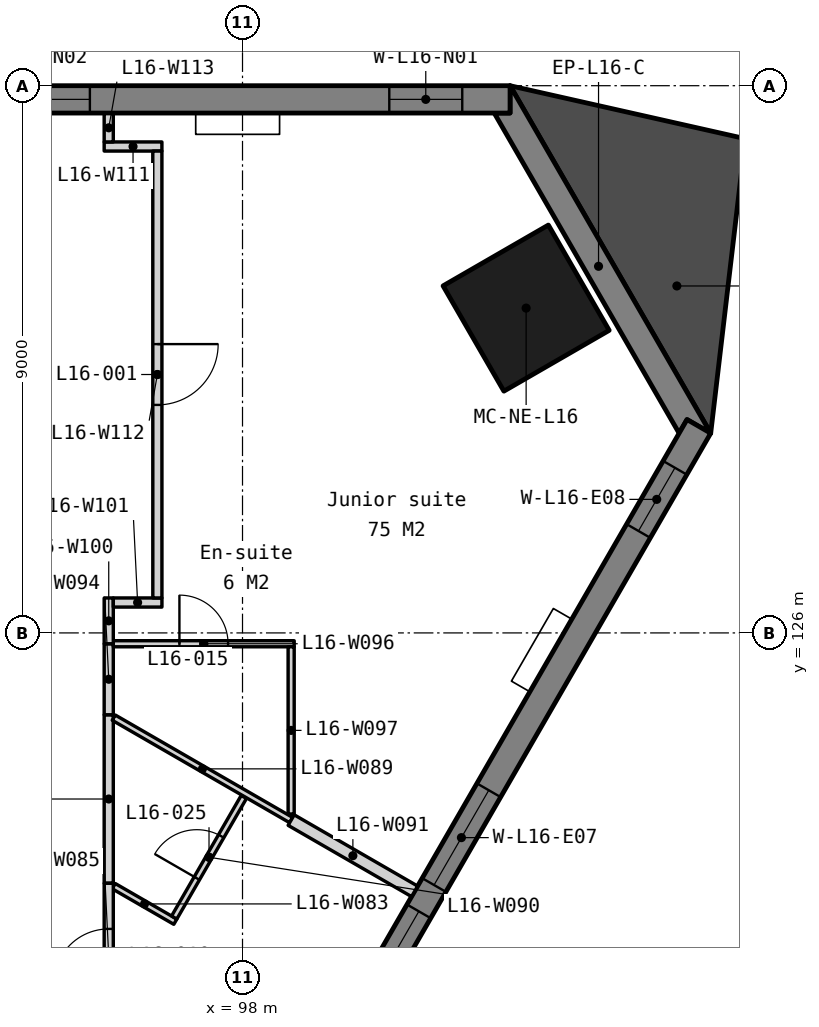
"""IFC4 building model, lengths in metres.
Left out: names, types, materials, properties, quantities, classifications, styles, units other than length and angle.
Written with IfcOpenShell. Run it as: python <this file> out.ifc"""

import sys

from ifc_helpers import new_model, si_unit, direction, frame, frame_2d, origin, origin_2d, place, context, subcontext, project, spatial, polyline, rectangle, outline, extrude, element, fill, save


model = new_model("IFC4")
c1 = context("Model", 3, precision=1e-05, world=origin(), true_north=direction((0.0, 1.0)))
c2 = subcontext(c1, "Body", "Model", "MODEL_VIEW")
j1 = project(units=[si_unit("LENGTHUNIT", "METRE"), si_unit("PLANEANGLEUNIT", "RADIAN")], contexts=[c1])
p1 = place(None, origin())
s1 = spatial("IfcSite", under=j1, at=p1, CompositionType="ELEMENT")
p2 = place(p1, origin())
s2 = spatial("IfcBuilding", under=s1, at=p2, CompositionType="ELEMENT")
p3 = place(p2, frame((0.0, 0.0, 70.0)))
s3 = spatial("IfcBuildingStorey", under=s2, at=p3, CompositionType="ELEMENT", Elevation=70.0)
p4 = place(p3, frame((102.664, 131.342, 0.0), z_axis=(0.0, 0.0, 1.0), x_axis=(-0.5, 0.866025403784, 0.0)))
e1 = element("IfcColumn", 1, at=p4, inside=s3, PredefinedType="COLUMN", context=c2, shape_type="SweptSolid", body=[
    extrude(rectangle(XDim=2.0, YDim=2.0, at=origin_2d()), origin(), (0.0, 0.0, 1.0), 3.5),
])
p5 = place(p3, frame((0.0, 0.0, -0.15)))
e2 = element("IfcWall", 2, at=p5, inside=s3, PredefinedType="SOLIDWALL", context=c2, shape_type="SweptSolid", body=[
    extrude(outline(polyline([(105.7, 129.284), (105.31, 129.509), (105.18, 129.284), (102.14, 134.55), (102.4, 134.55), (102.4, 135.0), (105.7, 129.284)])), origin(), (0.0, 0.0, 1.0), 3.5),
])
p6 = place(p3, frame((102.4, 134.775, -0.15), z_axis=(0.0, 0.0, 1.0), x_axis=(-1.0, 0.0, 0.0)))
e3 = element("IfcWall", 3, at=p6, inside=s3, PredefinedType="SOLIDWALL", context=c2, shape_type="SweptSolid", body=[
    extrude(outline(polyline([(44.8, 0.0), (44.8, 3.5), (0.0, 3.5), (0.0, 0.0), (44.8, 0.0)])), frame((0.0, 0.225, 0.0), z_axis=(0.0, -1.0, 0.0), x_axis=(1.0, 0.0, 0.0)), (0.0, 0.0, 1.0), 0.45),
])
p7 = place(p6, frame((0.786, 0.0, 1.05)))
e4 = element("IfcOpeningElement", 4, at=p7, cuts=e3, PredefinedType="OPENING", context=c2, shape_type="SweptSolid", body=[
    extrude(rectangle(XDim=1.2, YDim=1.5, at=frame_2d((0.6, 0.75))), frame((0.0, 0.235, 0.0), z_axis=(0.0, -1.0, 0.0), x_axis=(1.0, 0.0, 0.0)), (0.0, 0.0, 1.0), 0.47),
])
p8 = place(p6, frame((6.91, 0.0, 1.05)))
e5 = element("IfcOpeningElement", 5, at=p8, cuts=e3, PredefinedType="OPENING", context=c2, shape_type="SweptSolid", body=[
    extrude(rectangle(XDim=1.8, YDim=1.5, at=frame_2d((0.9, 0.75))), frame((0.0, 0.235, 0.0), z_axis=(0.0, -1.0, 0.0), x_axis=(1.0, 0.0, 0.0)), (0.0, 0.0, 1.0), 0.47),
])
p9 = place(p6, frame((9.21, 0.0, 1.05)))
e6 = element("IfcOpeningElement", 6, at=p9, cuts=e3, PredefinedType="OPENING", context=c2, shape_type="SweptSolid", body=[
    extrude(rectangle(XDim=1.8, YDim=1.5, at=frame_2d((0.9, 0.75))), frame((0.0, 0.235, 0.0), z_axis=(0.0, -1.0, 0.0), x_axis=(1.0, 0.0, 0.0)), (0.0, 0.0, 1.0), 0.47),
])
p10 = place(p6, frame((15.87, 0.0, 1.05)))
e7 = element("IfcOpeningElement", 7, at=p10, cuts=e3, PredefinedType="OPENING", context=c2, shape_type="SweptSolid", body=[
    extrude(rectangle(XDim=1.8, YDim=1.5, at=frame_2d((0.9, 0.75))), frame((0.0, 0.235, 0.0), z_axis=(0.0, -1.0, 0.0), x_axis=(1.0, 0.0, 0.0)), (0.0, 0.0, 1.0), 0.47),
])
p11 = place(p6, frame((18.17, 0.0, 1.05)))
e8 = element("IfcOpeningElement", 8, at=p11, cuts=e3, PredefinedType="OPENING", context=c2, shape_type="SweptSolid", body=[
    extrude(rectangle(XDim=1.8, YDim=1.5, at=frame_2d((0.9, 0.75))), frame((0.0, 0.235, 0.0), z_axis=(0.0, -1.0, 0.0), x_axis=(1.0, 0.0, 0.0)), (0.0, 0.0, 1.0), 0.47),
])
p12 = place(p6, frame((24.83, 0.0, 1.05)))
e9 = element("IfcOpeningElement", 9, at=p12, cuts=e3, PredefinedType="OPENING", context=c2, shape_type="SweptSolid", body=[
    extrude(rectangle(XDim=1.8, YDim=1.5, at=frame_2d((0.9, 0.75))), frame((0.0, 0.235, 0.0), z_axis=(0.0, -1.0, 0.0), x_axis=(1.0, 0.0, 0.0)), (0.0, 0.0, 1.0), 0.47),
])
p13 = place(p6, frame((27.13, 0.0, 1.05)))
e10 = element("IfcOpeningElement", 10, at=p13, cuts=e3, PredefinedType="OPENING", context=c2, shape_type="SweptSolid", body=[
    extrude(rectangle(XDim=1.8, YDim=1.5, at=frame_2d((0.9, 0.75))), frame((0.0, 0.235, 0.0), z_axis=(0.0, -1.0, 0.0), x_axis=(1.0, 0.0, 0.0)), (0.0, 0.0, 1.0), 0.47),
])
p14 = place(p6, frame((33.79, 0.0, 1.05)))
e11 = element("IfcOpeningElement", 11, at=p14, cuts=e3, PredefinedType="OPENING", context=c2, shape_type="SweptSolid", body=[
    extrude(rectangle(XDim=1.8, YDim=1.5, at=frame_2d((0.9, 0.75))), frame((0.0, 0.235, 0.0), z_axis=(0.0, -1.0, 0.0), x_axis=(1.0, 0.0, 0.0)), (0.0, 0.0, 1.0), 0.47),
])
p15 = place(p6, frame((36.09, 0.0, 1.05)))
e12 = element("IfcOpeningElement", 12, at=p15, cuts=e3, PredefinedType="OPENING", context=c2, shape_type="SweptSolid", body=[
    extrude(rectangle(XDim=1.8, YDim=1.5, at=frame_2d((0.9, 0.75))), frame((0.0, 0.235, 0.0), z_axis=(0.0, -1.0, 0.0), x_axis=(1.0, 0.0, 0.0)), (0.0, 0.0, 1.0), 0.47),
])
p16 = place(p6, frame((42.814, 0.0, 1.05)))
e13 = element("IfcOpeningElement", 13, at=p16, cuts=e3, PredefinedType="OPENING", context=c2, shape_type="SweptSolid", body=[
    extrude(rectangle(XDim=1.2, YDim=1.5, at=frame_2d((0.6, 0.75))), frame((0.0, 0.235, 0.0), z_axis=(0.0, -1.0, 0.0), x_axis=(1.0, 0.0, 0.0)), (0.0, 0.0, 1.0), 0.47),
])
p17 = place(p3, frame((88.435, 99.831, -0.15), z_axis=(0.0, 0.0, 1.0), x_axis=(0.500000806382, 0.866024938219, 0.0)))
e14 = element("IfcWall", 14, at=p17, inside=s3, PredefinedType="SOLIDWALL", context=c2, shape_type="SweptSolid", body=[
    extrude(outline(polyline([(34.14, 3.5), (34.14, 0.0), (0.0, 0.0), (0.0, 3.5), (34.14, 3.5)])), frame((0.0, 0.225, 0.0), z_axis=(0.0, -1.0, 0.0), x_axis=(1.0, 0.0, 0.0)), (0.0, 0.0, 1.0), 0.45),
])
p18 = place(p17, frame((5.21, 0.0, 1.05)))
e15 = element("IfcOpeningElement", 15, at=p18, cuts=e14, PredefinedType="OPENING", context=c2, shape_type="SweptSolid", body=[
    extrude(rectangle(XDim=1.8, YDim=1.5, at=frame_2d((0.9, 0.75))), frame((0.0, 0.235, 0.0), z_axis=(0.0, -1.0, 0.0), x_axis=(1.0, 0.0, 0.0)), (0.0, 0.0, 1.0), 0.47),
])
p19 = place(p17, frame((7.51, 0.0, 1.05)))
e16 = element("IfcOpeningElement", 16, at=p19, cuts=e14, PredefinedType="OPENING", context=c2, shape_type="SweptSolid", body=[
    extrude(rectangle(XDim=1.8, YDim=1.5, at=frame_2d((0.9, 0.75))), frame((0.0, 0.235, 0.0), z_axis=(0.0, -1.0, 0.0), x_axis=(1.0, 0.0, 0.0)), (0.0, 0.0, 1.0), 0.47),
])
p20 = place(p17, frame((14.17, 0.0, 1.05)))
e17 = element("IfcOpeningElement", 17, at=p20, cuts=e14, PredefinedType="OPENING", context=c2, shape_type="SweptSolid", body=[
    extrude(rectangle(XDim=1.8, YDim=1.5, at=frame_2d((0.9, 0.75))), frame((0.0, 0.235, 0.0), z_axis=(0.0, -1.0, 0.0), x_axis=(1.0, 0.0, 0.0)), (0.0, 0.0, 1.0), 0.47),
])
p21 = place(p17, frame((16.47, 0.0, 1.05)))
e18 = element("IfcOpeningElement", 18, at=p21, cuts=e14, PredefinedType="OPENING", context=c2, shape_type="SweptSolid", body=[
    extrude(rectangle(XDim=1.8, YDim=1.5, at=frame_2d((0.9, 0.75))), frame((0.0, 0.235, 0.0), z_axis=(0.0, -1.0, 0.0), x_axis=(1.0, 0.0, 0.0)), (0.0, 0.0, 1.0), 0.47),
])
p22 = place(p17, frame((23.13, 0.0, 1.05)))
e19 = element("IfcOpeningElement", 19, at=p22, cuts=e14, PredefinedType="OPENING", context=c2, shape_type="SweptSolid", body=[
    extrude(rectangle(XDim=1.8, YDim=1.5, at=frame_2d((0.9, 0.75))), frame((0.0, 0.235, 0.0), z_axis=(0.0, -1.0, 0.0), x_axis=(1.0, 0.0, 0.0)), (0.0, 0.0, 1.0), 0.47),
])
p23 = place(p17, frame((25.43, 0.0, 1.05)))
e20 = element("IfcOpeningElement", 20, at=p23, cuts=e14, PredefinedType="OPENING", context=c2, shape_type="SweptSolid", body=[
    extrude(rectangle(XDim=1.8, YDim=1.5, at=frame_2d((0.9, 0.75))), frame((0.0, 0.235, 0.0), z_axis=(0.0, -1.0, 0.0), x_axis=(1.0, 0.0, 0.0)), (0.0, 0.0, 1.0), 0.47),
])
p24 = place(p17, frame((32.154, 0.0, 1.05)))
e21 = element("IfcOpeningElement", 21, at=p24, cuts=e14, PredefinedType="OPENING", context=c2, shape_type="SweptSolid", body=[
    extrude(rectangle(XDim=1.2, YDim=1.5, at=frame_2d((0.6, 0.75))), frame((0.0, 0.235, 0.0), z_axis=(0.0, -1.0, 0.0), x_axis=(1.0, 0.0, 0.0)), (0.0, 0.0, 1.0), 0.47),
])
p25 = place(p3, frame((0.0, 0.0, -0.15)))
e22 = element("IfcWall", 22, at=p25, inside=s3, PredefinedType="SOLIDWALL", context=c2, shape_type="SweptSolid", body=[
    extrude(outline(polyline([(105.7, 129.284), (106.27, 134.128), (102.4, 135.0), (105.7, 129.284)])), origin(), (0.0, 0.0, 1.0), 3.5),
])
p26 = place(p3, frame((95.882, 121.835, 0.0), z_axis=(0.0, 0.0, 1.0), x_axis=(0.86601174498, -0.500023656998, 0.0)))
e23 = element("IfcWall", 23, at=p26, inside=s3, PredefinedType="PARTITIONING", context=c2, shape_type="SweptSolid", body=[
    extrude(rectangle(XDim=1.169, YDim=0.1, at=frame_2d((0.585, 0.0))), origin(), (0.0, 0.0, 1.0), 3.35),
])
p27 = place(p3, frame((95.8, 121.883, 0.0), z_axis=(0.0, 0.0, 1.0), x_axis=(0.0, 1.0, 0.0)))
e24 = element("IfcWall", 24, at=p27, inside=s3, PredefinedType="PARTITIONING", context=c2, shape_type="SweptSolid", body=[
    extrude(rectangle(XDim=2.771, YDim=0.15, at=frame_2d((1.386, 0.0))), origin(), (0.0, 0.0, 1.0), 3.35),
])
p28 = place(p3, frame((95.8, 119.481, 0.0), z_axis=(0.0, 0.0, 1.0), x_axis=(0.0, 1.0, 0.0)))
e25 = element("IfcWall", 25, at=p28, inside=s3, PredefinedType="PARTITIONING", context=c2, shape_type="SweptSolid", body=[
    extrude(rectangle(XDim=2.402, YDim=0.15, at=frame_2d((1.201, 0.0))), origin(), (0.0, 0.0, 1.0), 3.35),
])
p29 = place(p28, frame((0.751, 0.0, 0.0)))
e26 = element("IfcOpeningElement", 26, at=p29, cuts=e25, PredefinedType="OPENING", context=c2, shape_type="SweptSolid", body=[
    extrude(rectangle(XDim=0.9, YDim=2.1, at=frame_2d((0.45, 1.05))), frame((0.0, 0.085, 0.0), z_axis=(0.0, -1.0, 0.0), x_axis=(1.0, 0.0, 0.0)), (0.0, 0.0, 1.0), 0.17),
])
p30 = place(p3, frame((95.882, 124.606, 0.0), z_axis=(0.0, 0.0, 1.0), x_axis=(0.866022675988, -0.500004724652, 0.0)))
e27 = element("IfcWall", 27, at=p30, inside=s3, PredefinedType="PARTITIONING", context=c2, shape_type="SweptSolid", body=[
    extrude(rectangle(XDim=3.369, YDim=0.1, at=frame_2d((1.685, 0.0))), origin(), (0.0, 0.0, 1.0), 3.35),
])
p31 = place(p3, frame((96.877, 121.319, 0.0), z_axis=(0.0, 0.0, 1.0), x_axis=(0.499968531483, 0.866043571379, 0.0)))
e28 = element("IfcWall", 28, at=p31, inside=s3, PredefinedType="PARTITIONING", context=c2, shape_type="SweptSolid", body=[
    extrude(rectangle(XDim=2.29, YDim=0.1, at=frame_2d((1.145, 0.0))), origin(), (0.0, 0.0, 1.0), 3.35),
])
p32 = place(p31, frame((0.745, 0.0, 0.0)))
e29 = element("IfcOpeningElement", 29, at=p32, cuts=e28, PredefinedType="OPENING", context=c2, shape_type="SweptSolid", body=[
    extrude(rectangle(XDim=0.8, YDim=2.1, at=frame_2d((0.4, 1.05))), frame((0.0, 0.06, 0.0), z_axis=(0.0, -1.0, 0.0), x_axis=(1.0, 0.0, 0.0)), (0.0, 0.0, 1.0), 0.12),
])
p33 = place(p3, frame((98.8, 122.922, 0.0), z_axis=(0.0, 0.0, 1.0), x_axis=(0.866036444415, -0.49998087658, 0.0)))
e30 = element("IfcWall", 30, at=p33, inside=s3, PredefinedType="PARTITIONING", context=c2, shape_type="SweptSolid", body=[
    extrude(rectangle(XDim=2.344, YDim=0.2, at=frame_2d((1.172, 0.0))), origin(), (0.0, 0.0, 1.0), 3.35),
])
p34 = place(p3, frame((95.8, 124.654, 0.0), z_axis=(0.0, 0.0, 1.0), x_axis=(0.0, 1.0, 0.0)))
e31 = element("IfcWall", 31, at=p34, inside=s3, PredefinedType="PARTITIONING", context=c2, shape_type="SweptSolid", body=[
    extrude(rectangle(XDim=1.168, YDim=0.15, at=frame_2d((0.584, 0.0))), origin(), (0.0, 0.0, 1.0), 3.35),
])
p35 = place(p3, frame((95.875, 125.822, 0.0), z_axis=(0.0, 0.0, 1.0), x_axis=(1.0, 0.0, 0.0)))
e32 = element("IfcWall", 32, at=p35, inside=s3, PredefinedType="PARTITIONING", context=c2, shape_type="SweptSolid", body=[
    extrude(rectangle(XDim=2.975, YDim=0.1, at=frame_2d((1.488, 0.0))), origin(), (0.0, 0.0, 1.0), 3.35),
])
p36 = place(p35, frame((1.087, 0.0, 0.0)))
e33 = element("IfcOpeningElement", 33, at=p36, cuts=e32, PredefinedType="OPENING", context=c2, shape_type="SweptSolid", body=[
    extrude(rectangle(XDim=0.8, YDim=2.1, at=frame_2d((0.4, 1.05))), frame((0.0, 0.06, 0.0), z_axis=(0.0, -1.0, 0.0), x_axis=(1.0, 0.0, 0.0)), (0.0, 0.0, 1.0), 0.12),
])
p37 = place(p3, frame((98.8, 123.022, 0.0), z_axis=(0.0, 0.0, 1.0), x_axis=(0.0, 1.0, 0.0)))
e34 = element("IfcWall", 34, at=p37, inside=s3, PredefinedType="PARTITIONING", context=c2, shape_type="SweptSolid", body=[
    extrude(rectangle(XDim=2.75, YDim=0.1, at=frame_2d((1.375, 0.0))), origin(), (0.0, 0.0, 1.0), 3.35),
])
p38 = place(p3, frame((95.8, 125.822, 0.0), z_axis=(0.0, 0.0, 1.0), x_axis=(0.0, 1.0, 0.0)))
e35 = element("IfcWall", 35, at=p38, inside=s3, PredefinedType="PARTITIONING", context=c2, shape_type="SweptSolid", body=[
    extrude(rectangle(XDim=0.753, YDim=0.15, at=frame_2d((0.376, 0.0))), origin(), (0.0, 0.0, 1.0), 3.35),
])
p39 = place(p3, frame((95.875, 126.5, 0.0), z_axis=(0.0, 0.0, 1.0), x_axis=(1.0, 0.0, 0.0)))
e36 = element("IfcWall", 36, at=p39, inside=s3, PredefinedType="PARTITIONING", context=c2, shape_type="SweptSolid", body=[
    extrude(rectangle(XDim=0.8, YDim=0.15, at=frame_2d((0.4, 0.0))), origin(), (0.0, 0.0, 1.0), 3.35),
])
p40 = place(p3, frame((95.725, 134.0, 0.0), z_axis=(0.0, 0.0, 1.0), x_axis=(1.0, 0.0, 0.0)))
e37 = element("IfcWall", 37, at=p40, inside=s3, PredefinedType="PARTITIONING", context=c2, shape_type="SweptSolid", body=[
    extrude(rectangle(XDim=0.949, YDim=0.15, at=frame_2d((0.475, 0.0))), origin(), (0.0, 0.0, 1.0), 2.887),
])
p41 = place(p3, frame((96.6, 133.925, 0.0), z_axis=(0.0, 0.0, 1.0), x_axis=(6.643194e-05, -0.999999997793, 0.0)))
e38 = element("IfcWall", 38, at=p41, inside=s3, PredefinedType="PARTITIONING", context=c2, shape_type="SweptSolid", body=[
    extrude(rectangle(XDim=7.35, YDim=0.15, at=frame_2d((3.675, 0.0))), origin(), (0.0, 0.0, 1.0), 3.35),
])
p42 = place(p41, frame((3.175, 0.0, 0.0)))
e39 = element("IfcOpeningElement", 39, at=p42, cuts=e38, PredefinedType="OPENING", context=c2, shape_type="SweptSolid", body=[
    extrude(rectangle(XDim=1.0, YDim=2.1, at=frame_2d((0.5, 1.05))), frame((0.0, 0.085, 0.0), z_axis=(0.0, -1.0, 0.0), x_axis=(1.0, 0.0, 0.0)), (0.0, 0.0, 1.0), 0.17),
])
p43 = place(p3, frame((95.8, 134.075, 0.0), z_axis=(0.0, 0.0, 1.0), x_axis=(0.0, 1.0, 0.0)))
e40 = element("IfcWall", 40, at=p43, inside=s3, PredefinedType="PARTITIONING", context=c2, shape_type="SweptSolid", body=[
    extrude(rectangle(XDim=0.465, YDim=0.15, at=frame_2d((0.232, 0.0))), origin(), (0.0, 0.0, 1.0), 3.35),
])
p44 = place(p7, origin())
e41 = element("IfcWindow", 41, at=p44, inside=s3, PartitioningType="SINGLE_PANEL", PredefinedType="WINDOW", context=c2, shape_type="SweptSolid", body=[
    extrude(rectangle(XDim=1.2, YDim=1.5, at=frame_2d((0.6, 0.75))), frame((0.0, 0.03, 0.0), z_axis=(0.0, -1.0, 0.0), x_axis=(1.0, 0.0, 0.0)), (0.0, 0.0, 1.0), 0.06),
])
fill(e4, e41)
p45 = place(p8, origin())
e42 = element("IfcWindow", 42, at=p45, inside=s3, PartitioningType="SINGLE_PANEL", PredefinedType="WINDOW", context=c2, shape_type="SweptSolid", body=[
    extrude(rectangle(XDim=1.8, YDim=1.5, at=frame_2d((0.9, 0.75))), frame((0.0, 0.03, 0.0), z_axis=(0.0, -1.0, 0.0), x_axis=(1.0, 0.0, 0.0)), (0.0, 0.0, 1.0), 0.06),
])
fill(e5, e42)
p46 = place(p22, origin())
e43 = element("IfcWindow", 43, at=p46, inside=s3, PartitioningType="SINGLE_PANEL", PredefinedType="WINDOW", context=c2, shape_type="SweptSolid", body=[
    extrude(rectangle(XDim=1.8, YDim=1.5, at=frame_2d((0.9, 0.75))), frame((0.0, 0.03, 0.0), z_axis=(0.0, -1.0, 0.0), x_axis=(1.0, 0.0, 0.0)), (0.0, 0.0, 1.0), 0.06),
])
fill(e19, e43)
p47 = place(p23, origin())
e44 = element("IfcWindow", 44, at=p47, inside=s3, PartitioningType="SINGLE_PANEL", PredefinedType="WINDOW", context=c2, shape_type="SweptSolid", body=[
    extrude(rectangle(XDim=1.8, YDim=1.5, at=frame_2d((0.9, 0.75))), frame((0.0, 0.03, 0.0), z_axis=(0.0, -1.0, 0.0), x_axis=(1.0, 0.0, 0.0)), (0.0, 0.0, 1.0), 0.06),
])
fill(e20, e44)
p48 = place(p24, origin())
e45 = element("IfcWindow", 45, at=p48, inside=s3, PartitioningType="SINGLE_PANEL", PredefinedType="WINDOW", context=c2, shape_type="SweptSolid", body=[
    extrude(rectangle(XDim=1.2, YDim=1.5, at=frame_2d((0.6, 0.75))), frame((0.0, 0.03, 0.0), z_axis=(0.0, -1.0, 0.0), x_axis=(1.0, 0.0, 0.0)), (0.0, 0.0, 1.0), 0.06),
])
fill(e21, e45)
p49 = place(p42, origin())
e46 = element("IfcDoor", 46, at=p49, inside=s3, OperationType="SINGLE_SWING_LEFT", PredefinedType="DOOR", context=c2, shape_type="SweptSolid", body=[
    extrude(rectangle(XDim=1.0, YDim=2.1, at=frame_2d((0.5, 1.05))), frame((0.0, 0.025, 0.0), z_axis=(0.0, -1.0, 0.0), x_axis=(1.0, 0.0, 0.0)), (0.0, 0.0, 1.0), 0.05),
])
fill(e39, e46)
p50 = place(p29, origin())
e47 = element("IfcDoor", 47, at=p50, inside=s3, OperationType="SINGLE_SWING_LEFT", PredefinedType="DOOR", context=c2, shape_type="SweptSolid", body=[
    extrude(rectangle(XDim=0.9, YDim=2.1, at=frame_2d((0.45, 1.05))), frame((0.0, 0.025, 0.0), z_axis=(0.0, -1.0, 0.0), x_axis=(1.0, 0.0, 0.0)), (0.0, 0.0, 1.0), 0.05),
])
fill(e26, e47)
p51 = place(p36, origin())
e48 = element("IfcDoor", 48, at=p51, inside=s3, OperationType="SINGLE_SWING_LEFT", PredefinedType="DOOR", context=c2, shape_type="SweptSolid", body=[
    extrude(rectangle(XDim=0.8, YDim=2.1, at=frame_2d((0.4, 1.05))), frame((0.0, 0.025, 0.0), z_axis=(0.0, -1.0, 0.0), x_axis=(1.0, 0.0, 0.0)), (0.0, 0.0, 1.0), 0.05),
])
fill(e33, e48)
p52 = place(p32, origin())
e49 = element("IfcDoor", 49, at=p52, inside=s3, OperationType="SINGLE_SWING_LEFT", PredefinedType="DOOR", context=c2, shape_type="SweptSolid", body=[
    extrude(rectangle(XDim=0.8, YDim=2.1, at=frame_2d((0.4, 1.05))), frame((0.0, 0.025, 0.0), z_axis=(0.0, -1.0, 0.0), x_axis=(1.0, 0.0, 0.0)), (0.0, 0.0, 1.0), 0.05),
])
fill(e29, e49)
save(model, sys.argv[1])
